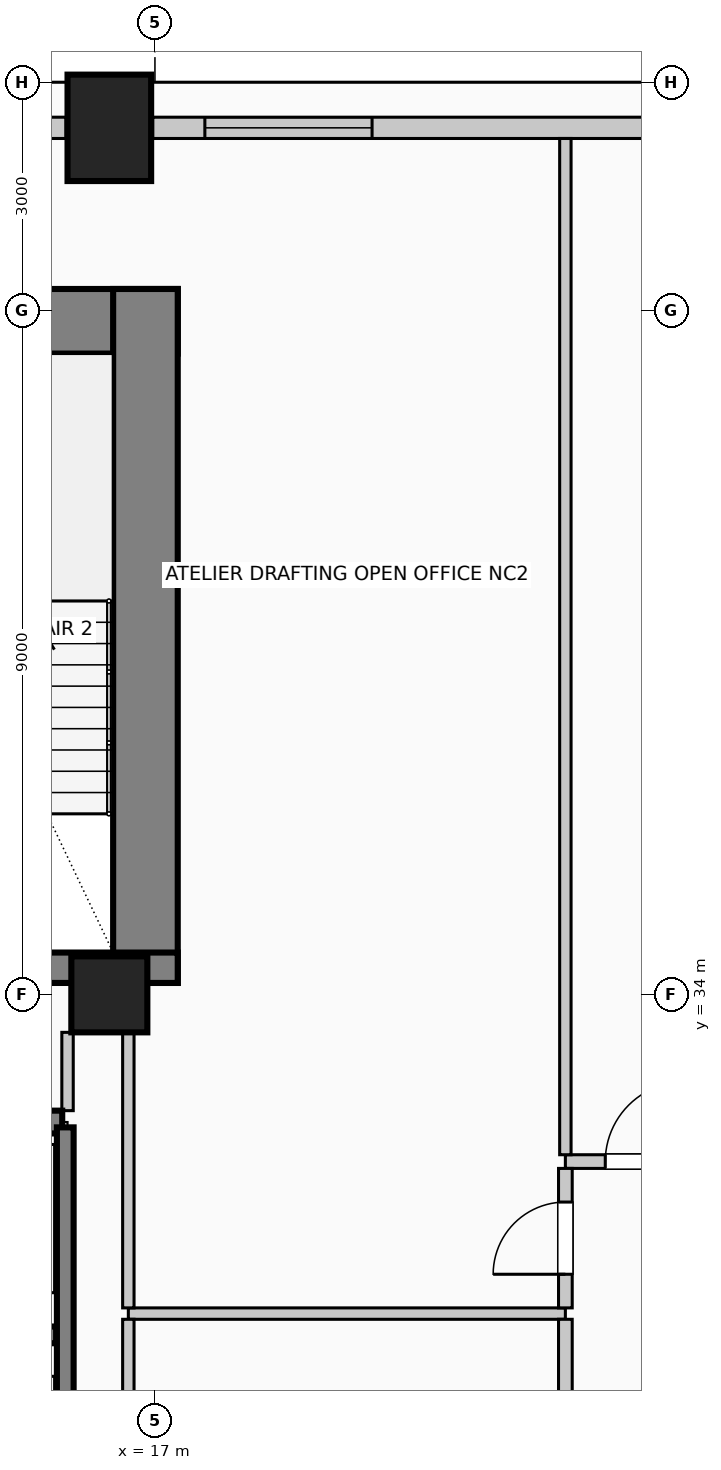
"""IFC4 building model, lengths in metres.
Left out: names, types, materials, properties, quantities, classifications, styles, units other than length and angle.
Written with IfcOpenShell. Run it as: python <this file> out.ifc"""

import sys

from ifc_helpers import new_model, si_unit, direction, frame, frame_2d, origin, origin_2d, place, context, subcontext, project, spatial, rectangle, circle, extrude, element, fill, save


model = new_model("IFC4")
c1 = context("Model", 3, precision=1e-05, world=origin(), true_north=direction((0.0, 1.0)))
c2 = subcontext(c1, "Body", "Model", "MODEL_VIEW")
j1 = project(units=[si_unit("LENGTHUNIT", "METRE"), si_unit("PLANEANGLEUNIT", "RADIAN")], contexts=[c1])
p1 = place(None, origin())
s1 = spatial("IfcSite", under=j1, at=p1, CompositionType="ELEMENT")
p2 = place(p1, origin())
s2 = spatial("IfcBuilding", under=s1, at=p2, CompositionType="ELEMENT")
p3 = place(p2, frame((0.0, 0.0, 140.6)))
s3 = spatial("IfcBuildingStorey", under=s2, at=p3, CompositionType="ELEMENT", Elevation=140.6)
p4 = place(p3, frame((2.7, 42.855, 0.0), z_axis=(0.0, 0.0, 1.0), x_axis=(1.0, 0.0, 0.0)))
e1 = element("IfcWall", 1, at=p4, inside=s3, PredefinedType="SHEAR", context=c2, shape_type="SweptSolid", body=[
    extrude(rectangle(XDim=14.6, YDim=0.85, at=frame_2d((7.3, 0.0))), origin(), (0.0, 0.0, 1.0), 4.0),
])
p5 = place(p3, frame((16.875, 34.15, 0.0), z_axis=(0.0, 0.0, 1.0), x_axis=(0.0, 1.0, 0.0)))
e2 = element("IfcWall", 2, at=p5, inside=s3, PredefinedType="SHEAR", context=c2, shape_type="SweptSolid", body=[
    extrude(rectangle(XDim=9.13, YDim=0.85, at=frame_2d((4.565, 0.0))), origin(), (0.0, 0.0, 1.0), 4.0),
])
p6 = place(p3, frame((12.29, 34.35, 0.0), z_axis=(0.0, 0.0, 1.0), x_axis=(1.0, 0.0, 0.0)))
e3 = element("IfcWall", 3, at=p6, inside=s3, PredefinedType="SHEAR", context=c2, shape_type="SweptSolid", body=[
    extrude(rectangle(XDim=5.01, YDim=0.4, at=frame_2d((2.505, 0.0))), origin(), (0.0, 0.0, 1.0), 4.0),
])
p7 = place(p6, frame((1.4, 0.0, 0.0)))
e4 = element("IfcOpeningElement", 4, at=p7, cuts=e3, PredefinedType="OPENING", context=c2, shape_type="SweptSolid", body=[
    extrude(rectangle(XDim=1.15, YDim=2.2, at=frame_2d((0.575, 1.1))), frame((0.0, 0.21, 0.0), z_axis=(0.0, -1.0, 0.0), x_axis=(1.0, 0.0, 0.0)), (0.0, 0.0, 1.0), 0.42),
])
p8 = place(p3, frame((16.4, 45.4, 0.0), z_axis=(0.0, 0.0, 1.0), x_axis=(1.0, 0.0, 0.0)))
e5 = element("IfcColumn", 5, at=p8, inside=s3, PredefinedType="COLUMN", context=c2, shape_type="SweptSolid", body=[
    extrude(rectangle(XDim=1.1, YDim=1.4, at=origin_2d()), origin(), (0.0, 0.0, 1.0), 4.0),
])
p9 = place(p3, frame((16.4, 34.0, 0.0), z_axis=(0.0, 0.0, 1.0), x_axis=(1.0, 0.0, 0.0)))
e6 = element("IfcColumn", 6, at=p9, inside=s3, PredefinedType="COLUMN", context=c2, shape_type="SweptSolid", body=[
    extrude(circle(Radius=0.5, at=origin_2d()), origin(), (0.0, 0.0, 1.0), 4.0),
])
p10 = place(p3, frame((14.445, 45.4, 0.0), z_axis=(0.0, 0.0, 1.0), x_axis=(1.0, 0.0, 0.0)))
e7 = element("IfcWall", 7, at=p10, inside=s3, PredefinedType="SOLIDWALL", context=c2, shape_type="SweptSolid", body=[
    extrude(rectangle(XDim=1.385, YDim=0.28, at=frame_2d((0.692, 0.0))), origin(), (0.0, 0.0, 1.0), 2.875),
])
p11 = place(p3, frame((16.97, 45.4, 0.0), z_axis=(0.0, 0.0, 1.0), x_axis=(1.0, 0.0, 0.0)))
e8 = element("IfcWall", 8, at=p11, inside=s3, PredefinedType="SOLIDWALL", context=c2, shape_type="SweptSolid", body=[
    extrude(rectangle(XDim=6.46, YDim=0.28, at=frame_2d((3.23, 0.0))), origin(), (0.0, 0.0, 1.0), 2.875),
])
p12 = place(p11, frame((0.687, 0.0, 0.5)))
e9 = element("IfcOpeningElement", 9, at=p12, cuts=e8, PredefinedType="OPENING", context=c2, shape_type="SweptSolid", body=[
    extrude(rectangle(XDim=2.2, YDim=1.95, at=frame_2d((1.1, 0.975))), frame((0.0, 0.15, 0.0), z_axis=(0.0, -1.0, 0.0), x_axis=(1.0, 0.0, 0.0)), (0.0, 0.0, 1.0), 0.3),
])
p13 = place(p3, frame((14.0, 32.32, 0.0), z_axis=(0.0, 0.0, 1.0), x_axis=(1.0, 0.0, 0.0)))
e10 = element("IfcWall", 10, at=p13, inside=s3, PredefinedType="SOLIDWALL", context=c2, shape_type="SweptSolid", body=[
    extrude(rectangle(XDim=1.78, YDim=0.3, at=frame_2d((0.89, 0.0))), origin(), (0.0, 0.0, 1.0), 4.0),
])
p14 = place(p13, frame((0.34, 0.0, 0.0)))
e11 = element("IfcOpeningElement", 11, at=p14, cuts=e10, PredefinedType="OPENING", context=c2, shape_type="SweptSolid", body=[
    extrude(rectangle(XDim=1.1, YDim=2.2, at=frame_2d((0.55, 1.1))), frame((0.0, 0.16, 0.0), z_axis=(0.0, -1.0, 0.0), x_axis=(1.0, 0.0, 0.0)), (0.0, 0.0, 1.0), 0.32),
])
p15 = place(p3, frame((15.82, 26.8, 0.0), z_axis=(0.0, 0.0, 1.0), x_axis=(0.0, 1.0, 0.0)))
e12 = element("IfcWall", 12, at=p15, inside=s3, PredefinedType="SOLIDWALL", context=c2, shape_type="SweptSolid", body=[
    extrude(rectangle(XDim=5.45, YDim=0.22, at=frame_2d((2.725, 0.0))), origin(), (0.0, 0.0, 1.0), 4.0),
])
p16 = place(p3, frame((12.3, 29.52, 0.0), z_axis=(0.0, 0.0, 1.0), x_axis=(1.0, 0.0, 0.0)))
e13 = element("IfcWall", 13, at=p16, inside=s3, PredefinedType="SOLIDWALL", context=c2, shape_type="SweptSolid", body=[
    extrude(rectangle(XDim=3.4, YDim=0.22, at=frame_2d((1.7, 0.0))), origin(), (0.0, 0.0, 1.0), 4.0),
])
p17 = place(p3, frame((16.65, 29.8, 0.0), z_axis=(0.0, 0.0, 1.0), x_axis=(1.0, 0.0, 0.0)))
e14 = element("IfcWall", 14, at=p17, inside=s3, PredefinedType="PARTITIONING", context=c2, shape_type="SweptSolid", body=[
    extrude(rectangle(XDim=5.75, YDim=0.15, at=frame_2d((2.875, 0.0))), origin(), (0.0, 0.0, 1.0), 3.725),
])
p18 = place(p3, frame((22.4, 31.8, 0.0), z_axis=(0.0, 0.0, 1.0), x_axis=(1.0, 0.0, 0.0)))
e15 = element("IfcWall", 15, at=p18, inside=s3, PredefinedType="PARTITIONING", context=c2, shape_type="SweptSolid", body=[
    extrude(rectangle(XDim=2.1, YDim=0.18, at=frame_2d((1.05, 0.0))), origin(), (0.0, 0.0, 1.0), 3.725),
])
p19 = place(p18, frame((0.525, 0.0, 0.0)))
e16 = element("IfcOpeningElement", 16, at=p19, cuts=e15, PredefinedType="OPENING", context=c2, shape_type="SweptSolid", body=[
    extrude(rectangle(XDim=1.05, YDim=2.15, at=frame_2d((0.525, 1.075))), frame((0.0, 0.1, 0.0), z_axis=(0.0, -1.0, 0.0), x_axis=(1.0, 0.0, 0.0)), (0.0, 0.0, 1.0), 0.2),
])
p20 = place(p3, frame((15.85, 32.47, 0.0), z_axis=(0.0, 0.0, 1.0), x_axis=(0.0, 1.0, 0.0)))
e17 = element("IfcWall", 17, at=p20, inside=s3, PredefinedType="PARTITIONING", context=c2, shape_type="SweptSolid", body=[
    extrude(rectangle(XDim=1.03, YDim=0.15, at=frame_2d((0.515, 0.0))), origin(), (0.0, 0.0, 1.0), 3.725),
])
p21 = place(p3, frame((16.65, 18.5, 0.0), z_axis=(0.0, 0.0, 1.0), x_axis=(0.0, 1.0, 0.0)))
e18 = element("IfcWall", 18, at=p21, inside=s3, PredefinedType="PARTITIONING", context=c2, shape_type="SweptSolid", body=[
    extrude(rectangle(XDim=11.225, YDim=0.15, at=frame_2d((5.613, 0.0))), origin(), (0.0, 0.0, 1.0), 3.07),
])
p22 = place(p3, frame((16.65, 29.875, 0.0), z_axis=(0.0, 0.0, 1.0), x_axis=(0.0, 1.0, 0.0)))
e19 = element("IfcWall", 19, at=p22, inside=s3, PredefinedType="PARTITIONING", context=c2, shape_type="SweptSolid", body=[
    extrude(rectangle(XDim=3.625, YDim=0.15, at=frame_2d((1.812, 0.0))), origin(), (0.0, 0.0, 1.0), 3.07),
])
p23 = place(p3, frame((22.4, 15.74, 0.0), z_axis=(0.0, 0.0, 1.0), x_axis=(0.0, 1.0, 0.0)))
e20 = element("IfcWall", 20, at=p23, inside=s3, PredefinedType="PARTITIONING", context=c2, shape_type="SweptSolid", body=[
    extrude(rectangle(XDim=13.985, YDim=0.18, at=frame_2d((6.993, 0.0))), origin(), (0.0, 0.0, 1.0), 3.725),
])
p24 = place(p3, frame((22.4, 29.875, 0.0), z_axis=(0.0, 0.0, 1.0), x_axis=(0.0, 1.0, 0.0)))
e21 = element("IfcWall", 21, at=p24, inside=s3, PredefinedType="PARTITIONING", context=c2, shape_type="SweptSolid", body=[
    extrude(rectangle(XDim=1.835, YDim=0.18, at=frame_2d((0.917, 0.0))), origin(), (0.0, 0.0, 1.0), 3.725),
])
p25 = place(p24, frame((0.442, 0.0, 0.0)))
e22 = element("IfcOpeningElement", 22, at=p25, cuts=e21, PredefinedType="OPENING", context=c2, shape_type="SweptSolid", body=[
    extrude(rectangle(XDim=0.95, YDim=2.15, at=frame_2d((0.475, 1.075))), frame((0.0, 0.1, 0.0), z_axis=(0.0, -1.0, 0.0), x_axis=(1.0, 0.0, 0.0)), (0.0, 0.0, 1.0), 0.2),
])
p26 = place(p3, frame((22.4, 31.89, 0.0), z_axis=(0.0, 0.0, 1.0), x_axis=(0.0, 1.0, 0.0)))
e23 = element("IfcWall", 23, at=p26, inside=s3, PredefinedType="PARTITIONING", context=c2, shape_type="SweptSolid", body=[
    extrude(rectangle(XDim=13.37, YDim=0.15, at=frame_2d((6.685, 0.0))), origin(), (0.0, 0.0, 1.0), 3.725),
])
p27 = place(p12, origin())
e24 = element("IfcWindow", 24, at=p27, inside=s3, PartitioningType="SINGLE_PANEL", PredefinedType="WINDOW", context=c2, shape_type="SweptSolid", body=[
    extrude(rectangle(XDim=2.2, YDim=1.95, at=frame_2d((1.1, 0.975))), frame((0.0, 0.03, 0.0), z_axis=(0.0, -1.0, 0.0), x_axis=(1.0, 0.0, 0.0)), (0.0, 0.0, 1.0), 0.06),
])
fill(e9, e24)
p28 = place(p19, origin())
e25 = element("IfcDoor", 25, at=p28, inside=s3, OperationType="SINGLE_SWING_RIGHT", PredefinedType="DOOR", context=c2, shape_type="SweptSolid", body=[
    extrude(rectangle(XDim=1.05, YDim=2.15, at=frame_2d((0.525, 1.075))), frame((0.0, 0.025, 0.0), z_axis=(0.0, -1.0, 0.0), x_axis=(1.0, 0.0, 0.0)), (0.0, 0.0, 1.0), 0.05),
])
fill(e16, e25)
p29 = place(p25, origin())
e26 = element("IfcDoor", 26, at=p29, inside=s3, OperationType="SINGLE_SWING_LEFT", PredefinedType="DOOR", context=c2, shape_type="SweptSolid", body=[
    extrude(rectangle(XDim=0.95, YDim=2.15, at=frame_2d((0.475, 1.075))), frame((0.0, 0.025, 0.0), z_axis=(0.0, -1.0, 0.0), x_axis=(1.0, 0.0, 0.0)), (0.0, 0.0, 1.0), 0.05),
])
fill(e22, e26)
save(model, sys.argv[1])
